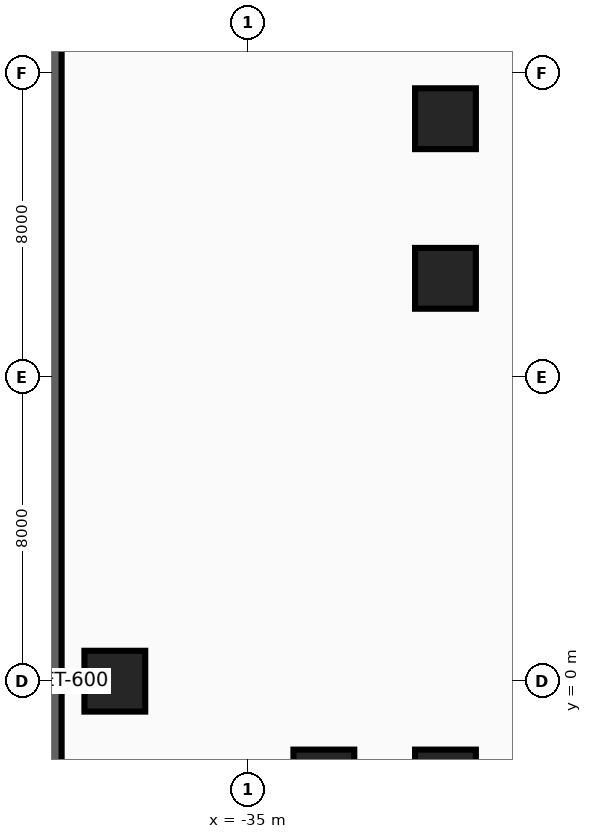
"""IFC4 building model, lengths in metres.
Left out: names, types, materials, properties, quantities, classifications, styles, units other than length and angle.
Written with IfcOpenShell. Run it as: python <this file> out.ifc"""

import sys

from ifc_helpers import new_model, si_unit, direction, frame, frame_2d, origin, origin_2d, place, context, subcontext, project, spatial, rectangle, extrude, source, transform, mapped, element, save


model = new_model("IFC4")
c1 = context("Model", 3, precision=1e-05, world=origin(), true_north=direction((0.0, 1.0)))
c2 = subcontext(c1, "Body", "Model", "MODEL_VIEW")
j1 = project(units=[si_unit("LENGTHUNIT", "METRE"), si_unit("PLANEANGLEUNIT", "RADIAN")], contexts=[c1])
p1 = place(None, origin())
s1 = spatial("IfcSite", under=j1, at=p1, CompositionType="ELEMENT")
p2 = place(p1, origin())
s2 = spatial("IfcBuilding", under=s1, at=p2, CompositionType="ELEMENT")
p3 = place(p2, frame((0.0, 0.0, -9.6)))
s3 = spatial("IfcBuildingStorey", under=s2, at=p3, CompositionType="ELEMENT", Elevation=-9.6)
p4 = place(p3, frame((-40.2, -27.9, 0.0), z_axis=(0.0, 0.0, 1.0), x_axis=(0.0, 1.0, 0.0)))
e1 = element("IfcWall", 1, at=p4, inside=s3, PredefinedType="SOLIDWALL", context=c2, shape_type="SweptSolid", body=[
    extrude(rectangle(XDim=55.8, YDim=0.6, at=frame_2d((27.9, 0.0))), origin(), (0.0, 0.0, 1.0), 4.54),
])
m1 = source(origin(), c2, "Body", "SweptSolid", [
    extrude(rectangle(XDim=1.6, YDim=1.6, at=origin_2d()), origin(), (0.0, 0.0, 1.0), 4.8),
])
for number, where, z_axis, x_axis in (
    (2, (-29.8, -2.6, 0.0), (0.0, 0.0, 1.0), (1.0, 0.0, 0.0)),
    (3, (-29.8, 10.6, 0.0), (0.0, 0.0, 1.0), (1.0, 0.0, 0.0)),
    (4, (-29.8, 14.8, 0.0), (0.0, 0.0, 1.0), (1.0, 0.0, 0.0)),
    (5, (-33.0, -2.6, 0.0), (0.0, 0.0, 1.0), (1.0, 0.0, 0.0)),
    (6, (-38.5, 0.0, 0.0), (0.0, 0.0, 1.0), (1.0, 0.0, 0.0)),
):
    element("IfcColumn", number, at=place(p3, frame(where, z_axis=z_axis, x_axis=x_axis)), inside=s3, PredefinedType="COLUMN", context=c2, shape_type="MappedRepresentation", body=[
        mapped(m1, transform((0.0, 0.0, 0.0), x_axis=(1.0, 0.0, 0.0), y_axis=(0.0, 1.0, 0.0), z_axis=(0.0, 0.0, 1.0), scale=1.0)),
    ])
save(model, sys.argv[1])
